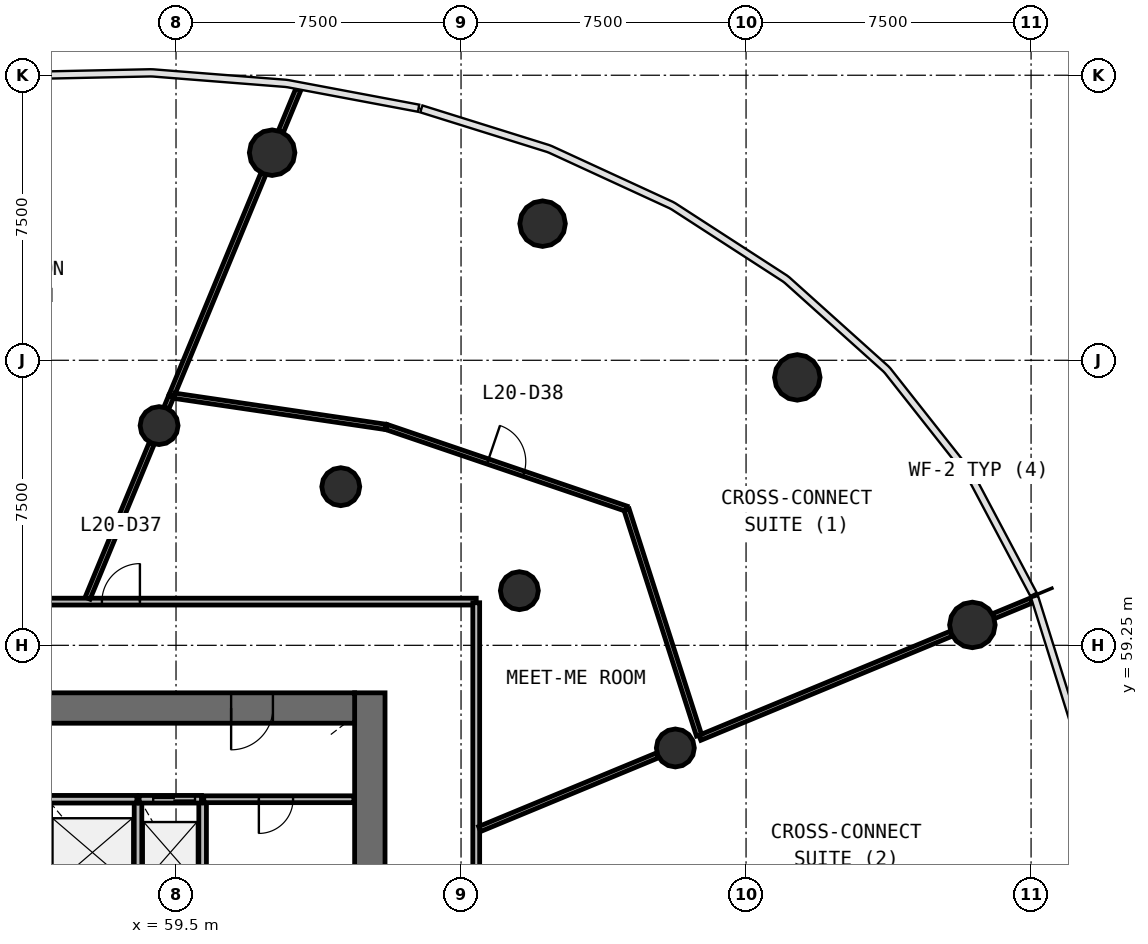
"""IFC4 building model, lengths in metres.
Left out: names, types, materials, properties, quantities, classifications, styles, units other than length and angle.
Written with IfcOpenShell. Run it as: python <this file> out.ifc"""

import sys

from ifc_helpers import new_model, si_unit, direction, frame, frame_2d, origin, origin_2d, place, context, subcontext, project, spatial, rectangle, circle, extrude, source, transform, mapped, element, fill, save


model = new_model("IFC4")
c1 = context("Model", 3, precision=1e-05, world=origin(), true_north=direction((0.0, 1.0)))
c2 = subcontext(c1, "Body", "Model", "MODEL_VIEW")
j1 = project(units=[si_unit("LENGTHUNIT", "METRE"), si_unit("PLANEANGLEUNIT", "RADIAN")], contexts=[c1])
p1 = place(None, origin())
s1 = spatial("IfcSite", under=j1, at=p1, CompositionType="ELEMENT")
p2 = place(p1, origin())
s2 = spatial("IfcBuilding", under=s1, at=p2, CompositionType="ELEMENT")
p3 = place(p2, frame((0.0, 0.0, 88.0)))
s3 = spatial("IfcBuildingStorey", under=s2, at=p3, CompositionType="ELEMENT", Elevation=88.0)
p4 = place(p3, frame((64.6, 38.0, 0.0), z_axis=(0.0, 0.0, 1.0), x_axis=(0.0, 1.0, 0.0)))
e1 = element("IfcWall", 1, at=p4, inside=s3, PredefinedType="SHEAR", context=c2, shape_type="SweptSolid", body=[
    extrude(rectangle(XDim=20.0, YDim=0.8, at=frame_2d((10.0, 0.0))), origin(), (0.0, 0.0, 1.0), 4.1),
])
p5 = place(p4, frame((9.1, 0.0, 0.0)))
e2 = element("IfcOpeningElement", 2, at=p5, cuts=e1, PredefinedType="OPENING", context=c2, shape_type="SweptSolid", body=[
    extrude(rectangle(XDim=1.8, YDim=2.1, at=frame_2d((0.9, 1.05))), frame((0.0, 0.41, 0.0), z_axis=(0.0, -1.0, 0.0), x_axis=(1.0, 0.0, 0.0)), (0.0, 0.0, 1.0), 0.82),
])
p6 = place(p3, frame((64.2, 57.6, 0.0), z_axis=(0.0, 0.0, 1.0), x_axis=(-1.0, 0.0, 0.0)))
e3 = element("IfcWall", 3, at=p6, inside=s3, PredefinedType="SHEAR", context=c2, shape_type="SweptSolid", body=[
    extrude(rectangle(XDim=24.4, YDim=0.8, at=frame_2d((12.2, 0.0))), origin(), (0.0, 0.0, 1.0), 4.1),
])
p7 = place(p6, frame((21.65, 0.0, 0.0)))
e4 = element("IfcOpeningElement", 4, at=p7, cuts=e3, PredefinedType="OPENING", context=c2, shape_type="SweptSolid", body=[
    extrude(rectangle(XDim=1.1, YDim=2.1, at=frame_2d((0.55, 1.05))), frame((0.0, 0.41, 0.0), z_axis=(0.0, -1.0, 0.0), x_axis=(1.0, 0.0, 0.0)), (0.0, 0.0, 1.0), 0.82),
])
p8 = place(p6, frame((2.15, 0.0, 0.0)))
e5 = element("IfcOpeningElement", 5, at=p8, cuts=e3, PredefinedType="OPENING", context=c2, shape_type="SweptSolid", body=[
    extrude(rectangle(XDim=1.1, YDim=2.1, at=frame_2d((0.55, 1.05))), frame((0.0, 0.41, 0.0), z_axis=(0.0, -1.0, 0.0), x_axis=(1.0, 0.0, 0.0)), (0.0, 0.0, 1.0), 0.82),
])
m1 = source(origin(), c2, "Body", "SweptSolid", [
    extrude(circle(Radius=0.6, at=origin_2d()), origin(), (0.0, 0.0, 1.0), 4.1),
])
for number, where, z_axis, x_axis in (
    (6, (80.456, 59.787, 0.0), (0.0, 0.0, 1.0), (1.0, 0.0, 0.0)),
    (7, (75.848, 66.299, 0.0), (0.0, 0.0, 1.0), (1.0, 0.0, 0.0)),
    (8, (69.146, 70.345, 0.0), (0.0, 0.0, 1.0), (1.0, 0.0, 0.0)),
    (9, (62.029, 72.212, 0.0), (0.0, 0.0, 1.0), (1.0, 0.0, 0.0)),
):
    element("IfcColumn", number, at=place(p3, frame(where, z_axis=z_axis, x_axis=x_axis)), inside=s3, PredefinedType="COLUMN", context=c2, shape_type="MappedRepresentation", body=[
        mapped(m1, transform((0.0, 0.0, 0.0), scale=1.0)),
    ])
m2 = source(origin(), c2, "Body", "SweptSolid", [
    extrude(circle(Radius=0.5, at=origin_2d()), origin(), (0.0, 0.0, 1.0), 4.1),
])
for number, where, z_axis, x_axis in (
    (10, (72.639, 56.549, 0.0), (0.0, 0.0, 1.0), (1.0, 0.0, 0.0)),
    (11, (68.535, 60.688, 0.0), (0.0, 0.0, 1.0), (1.0, 0.0, 0.0)),
    (12, (63.835, 63.424, 0.0), (0.0, 0.0, 1.0), (1.0, 0.0, 0.0)),
    (13, (59.055, 65.031, 0.0), (0.0, 0.0, 1.0), (1.0, 0.0, 0.0)),
):
    element("IfcColumn", number, at=place(p3, frame(where, z_axis=z_axis, x_axis=x_axis)), inside=s3, PredefinedType="COLUMN", context=c2, shape_type="MappedRepresentation", body=[
        mapped(m2, transform((0.0, 0.0, 0.0), scale=1.0)),
    ])
for number, where, z_axis, x_axis in (
    (14, (58.5, 52.4, 0.0), (0.0, 0.0, 1.0), (0.0, 1.0, 0.0)),
    (15, (60.2, 52.4, 0.0), (0.0, 0.0, 1.0), (0.0, 1.0, 0.0)),
):
    element("IfcWall", number, at=place(p3, frame(where, z_axis=z_axis, x_axis=x_axis)), inside=s3, PredefinedType="SOLIDWALL", context=c2, shape_type="SweptSolid", body=[
        extrude(rectangle(XDim=2.8, YDim=0.2, at=frame_2d((1.4, 0.0))), origin(), (0.0, 0.0, 1.0), 3.7),
    ])
p9 = place(p3, frame((58.47, 55.2, 0.0), z_axis=(0.0, 0.0, 1.0), x_axis=(-1.0, 0.0, 0.0)))
e16 = element("IfcWall", 16, at=p9, inside=s3, PredefinedType="SOLIDWALL", context=c2, shape_type="SweptSolid", body=[
    extrude(rectangle(XDim=2.34, YDim=0.2, at=frame_2d((1.17, 0.0))), origin(), (0.0, 0.0, 1.0), 3.7),
])
p10 = place(p3, frame((60.17, 55.2, 0.0), z_axis=(0.0, 0.0, 1.0), x_axis=(-1.0, 0.0, 0.0)))
e17 = element("IfcWall", 17, at=p10, inside=s3, PredefinedType="SOLIDWALL", context=c2, shape_type="SweptSolid", body=[
    extrude(rectangle(XDim=1.64, YDim=0.2, at=frame_2d((0.82, 0.0))), origin(), (0.0, 0.0, 1.0), 3.7),
])
p11 = place(p10, frame((0.17, 0.0, 0.0)))
e18 = element("IfcOpeningElement", 18, at=p11, cuts=e17, PredefinedType="OPENING", context=c2, shape_type="SweptSolid", body=[
    extrude(rectangle(XDim=1.1, YDim=2.1, at=frame_2d((0.55, 1.05))), frame((0.0, 0.11, 0.0), z_axis=(0.0, -1.0, 0.0), x_axis=(1.0, 0.0, 0.0)), (0.0, 0.0, 1.0), 0.22),
])
p12 = place(p3, frame((36.6, 60.4, 0.0), z_axis=(0.0, 0.0, 1.0), x_axis=(1.0, 0.0, 0.0)))
e19 = element("IfcWall", 19, at=p12, inside=s3, PredefinedType="PARTITIONING", context=c2, shape_type="SweptSolid", body=[
    extrude(rectangle(XDim=30.8, YDim=0.18, at=frame_2d((15.4, 0.0))), origin(), (0.0, 0.0, 1.0), 2.9),
])
p13 = place(p12, frame((20.95, 0.0, 0.0)))
e20 = element("IfcOpeningElement", 20, at=p13, cuts=e19, PredefinedType="OPENING", context=c2, shape_type="SweptSolid", body=[
    extrude(rectangle(XDim=1.0, YDim=2.1, at=frame_2d((0.5, 1.05))), frame((0.0, 0.1, 0.0), z_axis=(0.0, -1.0, 0.0), x_axis=(1.0, 0.0, 0.0)), (0.0, 0.0, 1.0), 0.2),
])
p14 = place(p12, frame((14.95, 0.0, 0.0)))
e21 = element("IfcOpeningElement", 21, at=p14, cuts=e19, PredefinedType="OPENING", context=c2, shape_type="SweptSolid", body=[
    extrude(rectangle(XDim=1.0, YDim=2.1, at=frame_2d((0.5, 1.05))), frame((0.0, 0.1, 0.0), z_axis=(0.0, -1.0, 0.0), x_axis=(1.0, 0.0, 0.0)), (0.0, 0.0, 1.0), 0.2),
])
p15 = place(p12, frame((12.55, 0.0, 0.0)))
e22 = element("IfcOpeningElement", 22, at=p15, cuts=e19, PredefinedType="OPENING", context=c2, shape_type="SweptSolid", body=[
    extrude(rectangle(XDim=1.0, YDim=2.1, at=frame_2d((0.5, 1.05))), frame((0.0, 0.1, 0.0), z_axis=(0.0, -1.0, 0.0), x_axis=(1.0, 0.0, 0.0)), (0.0, 0.0, 1.0), 0.2),
])
p16 = place(p3, frame((67.4, 60.37, 0.0), z_axis=(0.0, 0.0, 1.0), x_axis=(0.0, -1.0, 0.0)))
e23 = element("IfcWall", 23, at=p16, inside=s3, PredefinedType="PARTITIONING", context=c2, shape_type="SweptSolid", body=[
    extrude(rectangle(XDim=23.583, YDim=0.18, at=frame_2d((11.791, 0.0))), origin(), (0.0, 0.0, 1.0), 2.9),
])
p17 = place(p16, frame((14.732, 0.0, 0.0)))
e24 = element("IfcOpeningElement", 24, at=p17, cuts=e23, PredefinedType="OPENING", context=c2, shape_type="SweptSolid", body=[
    extrude(rectangle(XDim=1.0, YDim=2.1, at=frame_2d((0.5, 1.05))), frame((0.0, 0.1, 0.0), z_axis=(0.0, -1.0, 0.0), x_axis=(1.0, 0.0, 0.0)), (0.0, 0.0, 1.0), 0.2),
])
p18 = place(p16, frame((11.333, 0.0, 0.0)))
e25 = element("IfcOpeningElement", 25, at=p18, cuts=e23, PredefinedType="OPENING", context=c2, shape_type="SweptSolid", body=[
    extrude(rectangle(XDim=1.0, YDim=2.1, at=frame_2d((0.5, 1.05))), frame((0.0, 0.1, 0.0), z_axis=(0.0, -1.0, 0.0), x_axis=(1.0, 0.0, 0.0)), (0.0, 0.0, 1.0), 0.2),
])
p19 = place(p3, frame((64.18, 55.2, 0.0), z_axis=(0.0, 0.0, 1.0), x_axis=(-1.0, 0.0, 0.0)))
e26 = element("IfcWall", 26, at=p19, inside=s3, PredefinedType="PARTITIONING", context=c2, shape_type="SweptSolid", body=[
    extrude(rectangle(XDim=3.95, YDim=0.18, at=frame_2d((1.975, 0.0))), origin(), (0.0, 0.0, 1.0), 3.7),
])
p20 = place(p19, frame((1.6, 0.0, 0.0)))
e27 = element("IfcOpeningElement", 27, at=p20, cuts=e26, PredefinedType="OPENING", context=c2, shape_type="SweptSolid", body=[
    extrude(rectangle(XDim=0.9, YDim=2.1, at=frame_2d((0.45, 1.05))), frame((0.0, 0.1, 0.0), z_axis=(0.0, -1.0, 0.0), x_axis=(1.0, 0.0, 0.0)), (0.0, 0.0, 1.0), 0.2),
])
p21 = place(p3, frame((73.283, 56.816, 0.0), z_axis=(0.0, 0.0, 1.0), x_axis=(0.923877154041, 0.38268917445, 0.0)))
e28 = element("IfcWall", 28, at=p21, inside=s3, PredefinedType="PARTITIONING", context=c2, shape_type="SweptSolid", body=[
    extrude(rectangle(XDim=7.158, YDim=0.14, at=frame_2d((3.579, 0.0))), origin(), (0.0, 0.0, 1.0), 2.9),
])
p22 = place(p3, frame((65.04, 64.993, 0.0), z_axis=(0.0, 0.0, 1.0), x_axis=(0.946663935719, -0.32222258271, 0.0)))
e29 = element("IfcWall", 29, at=p22, inside=s3, PredefinedType="PARTITIONING", context=c2, shape_type="SweptSolid", body=[
    extrude(rectangle(XDim=6.664, YDim=0.14, at=frame_2d((3.332, 0.0))), origin(), (0.0, 0.0, 1.0), 2.9),
])
p23 = place(p22, frame((2.814, 0.0, 0.0)))
e30 = element("IfcOpeningElement", 30, at=p23, cuts=e29, PredefinedType="OPENING", context=c2, shape_type="SweptSolid", body=[
    extrude(rectangle(XDim=1.0, YDim=2.1, at=frame_2d((0.5, 1.05))), frame((0.0, 0.08, 0.0), z_axis=(0.0, -1.0, 0.0), x_axis=(1.0, 0.0, 0.0)), (0.0, 0.0, 1.0), 0.16),
])
p24 = place(p3, frame((73.262, 56.883, 0.0), z_axis=(0.0, 0.0, 1.0), x_axis=(-0.305632594526, 0.952149524583, 0.0)))
e31 = element("IfcWall", 31, at=p24, inside=s3, PredefinedType="PARTITIONING", context=c2, shape_type="SweptSolid", body=[
    extrude(rectangle(XDim=6.233, YDim=0.14, at=frame_2d((3.117, 0.0))), origin(), (0.0, 0.0, 1.0), 2.9),
])
p25 = place(p3, frame((59.385, 65.827, 0.0), z_axis=(0.0, 0.0, 1.0), x_axis=(0.382670932917, 0.923884709853, 0.0)))
e32 = element("IfcWall", 32, at=p25, inside=s3, PredefinedType="PARTITIONING", context=c2, shape_type="SweptSolid", body=[
    extrude(rectangle(XDim=6.306, YDim=0.14, at=frame_2d((3.153, 0.0))), origin(), (0.0, 0.0, 1.0), 2.9),
])
p26 = place(p3, frame((65.01, 64.998, 0.0), z_axis=(0.0, 0.0, 1.0), x_axis=(-0.989300140494, 0.145894592148, 0.0)))
e33 = element("IfcWall", 33, at=p26, inside=s3, PredefinedType="PARTITIONING", context=c2, shape_type="SweptSolid", body=[
    extrude(rectangle(XDim=5.614, YDim=0.14, at=frame_2d((2.807, 0.0))), origin(), (0.0, 0.0, 1.0), 2.9),
])
p27 = place(p3, frame((67.49, 54.416, 0.0), z_axis=(0.0, 0.0, 1.0), x_axis=(0.923890025086, 0.382658100067, 0.0)))
e34 = element("IfcWall", 34, at=p27, inside=s3, PredefinedType="PARTITIONING", context=c2, shape_type="SweptSolid", body=[
    extrude(rectangle(XDim=5.068, YDim=0.14, at=frame_2d((2.534, 0.0))), origin(), (0.0, 0.0, 1.0), 2.9),
])
p28 = place(p3, frame((57.174, 60.49, 0.0), z_axis=(0.0, 0.0, 1.0), x_axis=(0.382672831764, 0.923883923353, 0.0)))
e35 = element("IfcWall", 35, at=p28, inside=s3, PredefinedType="PARTITIONING", context=c2, shape_type="SweptSolid", body=[
    extrude(rectangle(XDim=4.41, YDim=0.14, at=frame_2d((2.205, 0.0))), origin(), (0.0, 0.0, 1.0), 2.9),
])
p29 = place(p3, frame((62.26, 72.771, 0.0), z_axis=(0.0, 0.0, 1.0), x_axis=(0.382680855588, 0.923880599843, 0.0)))
e36 = element("IfcWall", 36, at=p29, inside=s3, PredefinedType="PARTITIONING", context=c2, shape_type="SweptSolid", body=[
    extrude(rectangle(XDim=1.201, YDim=0.14, at=frame_2d((0.601, 0.0))), origin(), (0.0, 0.0, 1.0), 2.9),
])
p30 = place(p3, frame((81.014, 60.018, 0.0), z_axis=(0.0, 0.0, 1.0), x_axis=(0.923956302996, 0.382498039412, 0.0)))
e37 = element("IfcWall", 37, at=p30, inside=s3, PredefinedType="PARTITIONING", context=c2, shape_type="SweptSolid", body=[
    extrude(rectangle(XDim=1.081, YDim=0.14, at=frame_2d((0.541, 0.0))), origin(), (0.0, 0.0, 1.0), 2.9),
])
p31 = place(p3, frame((59.248, 65.498, 0.0), z_axis=(0.0, 0.0, 1.0), x_axis=(0.382439756991, 0.923980428512, 0.0)))
e38 = element("IfcWall", 38, at=p31, inside=s3, PredefinedType="PARTITIONING", context=c2, shape_type="SweptSolid", body=[
    extrude(rectangle(XDim=0.327, YDim=0.14, at=frame_2d((0.164, 0.0))), origin(), (0.0, 0.0, 1.0), 2.9),
])
m3 = source(origin(), c2, "Body", "SweptSolid", [
    extrude(rectangle(XDim=1.1, YDim=2.1, at=frame_2d((0.55, 1.05))), frame((0.0, 0.025, 0.0), z_axis=(0.0, -1.0, 0.0), x_axis=(1.0, 0.0, 0.0)), (0.0, 0.0, 1.0), 0.05),
])
p32 = place(p11, origin())
e39 = element("IfcDoor", 39, at=p32, inside=s3, OperationType="DOUBLE_DOOR_SLIDING", PredefinedType="USERDEFINED", context=c2, shape_type="MappedRepresentation", body=[
    mapped(m3, transform((0.0, 0.0, 0.0), scale=1.0)),
])
fill(e18, e39)
m4 = source(origin(), c2, "Body", "SweptSolid", [
    extrude(rectangle(XDim=1.1, YDim=2.1, at=frame_2d((0.55, 1.05))), frame((0.0, 0.025, 0.0), z_axis=(0.0, -1.0, 0.0), x_axis=(1.0, 0.0, 0.0)), (0.0, 0.0, 1.0), 0.05),
])
p33 = place(p8, origin())
e40 = element("IfcDoor", 40, at=p33, inside=s3, OperationType="SINGLE_SWING_RIGHT", PredefinedType="DOOR", context=c2, shape_type="MappedRepresentation", body=[
    mapped(m4, transform((0.0, 0.0, 0.0), scale=1.0)),
])
fill(e5, e40)
m5 = source(origin(), c2, "Body", "SweptSolid", [
    extrude(rectangle(XDim=1.0, YDim=2.1, at=frame_2d((0.5, 1.05))), frame((0.0, 0.025, 0.0), z_axis=(0.0, -1.0, 0.0), x_axis=(1.0, 0.0, 0.0)), (0.0, 0.0, 1.0), 0.05),
])
p34 = place(p13, origin())
e41 = element("IfcDoor", 41, at=p34, inside=s3, OperationType="SINGLE_SWING_RIGHT", PredefinedType="DOOR", context=c2, shape_type="MappedRepresentation", body=[
    mapped(m5, transform((0.0, 0.0, 0.0), scale=1.0)),
])
fill(e20, e41)
p35 = place(p23, origin())
e42 = element("IfcDoor", 42, at=p35, inside=s3, OperationType="SINGLE_SWING_LEFT", PredefinedType="DOOR", context=c2, shape_type="MappedRepresentation", body=[
    mapped(m5, transform((0.0, 0.0, 0.0), scale=1.0)),
])
fill(e30, e42)
m6 = source(origin(), c2, "Body", "SweptSolid", [
    extrude(rectangle(XDim=0.9, YDim=2.1, at=frame_2d((0.45, 1.05))), frame((0.0, 0.025, 0.0), z_axis=(0.0, -1.0, 0.0), x_axis=(1.0, 0.0, 0.0)), (0.0, 0.0, 1.0), 0.05),
])
p36 = place(p20, origin())
e43 = element("IfcDoor", 43, at=p36, inside=s3, OperationType="SINGLE_SWING_RIGHT", PredefinedType="DOOR", context=c2, shape_type="MappedRepresentation", body=[
    mapped(m6, transform((0.0, 0.0, 0.0), scale=1.0)),
])
fill(e27, e43)
save(model, sys.argv[1])
